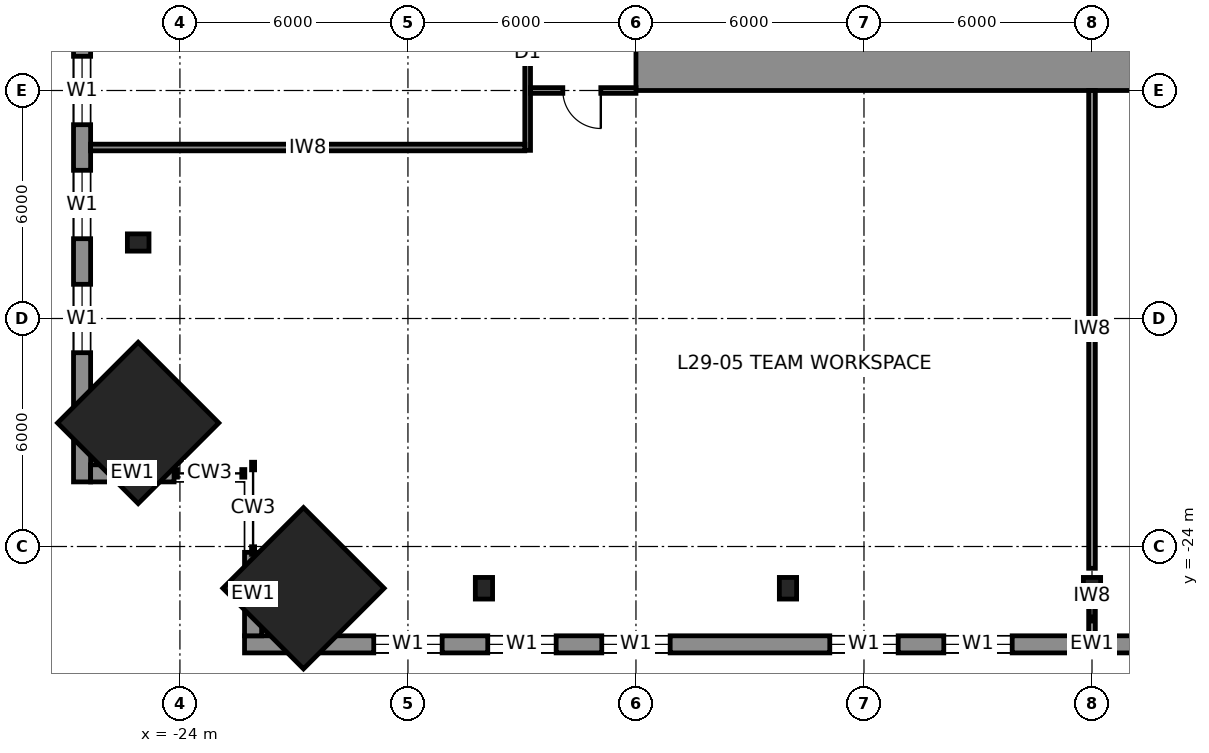
"""IFC4 building model, lengths in metres.
Left out: names, types, materials, properties, quantities, classifications, styles, units other than length and angle.
Written with IfcOpenShell. Run it as: python <this file> out.ifc"""

import sys

from ifc_helpers import new_model, si_unit, direction, frame, frame_2d, origin, origin_2d, place, context, subcontext, project, spatial, rectangle, i_section, extrude, element, fill, save


model = new_model("IFC4")
c1 = context("Model", 3, precision=1e-05, world=origin(), true_north=direction((0.0, 1.0)))
c2 = subcontext(c1, "Body", "Model", "MODEL_VIEW")
j1 = project(units=[si_unit("LENGTHUNIT", "METRE"), si_unit("PLANEANGLEUNIT", "RADIAN")], contexts=[c1])
p1 = place(None, origin())
s1 = spatial("IfcSite", under=j1, at=p1, CompositionType="ELEMENT")
p2 = place(p1, origin())
s2 = spatial("IfcBuilding", under=s1, at=p2, CompositionType="ELEMENT")
p3 = place(p2, frame((0.0, 0.0, 143.8)))
s3 = spatial("IfcBuildingStorey", under=s2, at=p3, CompositionType="ELEMENT", Elevation=143.8)
for number, where, z_axis, x_axis in (
    (1, (-20.748, -25.098, 0.0), (0.04, 0.04, 0.998), (-0.708, 0.707, 0.0)),
    (2, (-25.098, -20.748, 0.0), (0.04, 0.04, 0.998), (-0.707, 0.708, 0.0)),
):
    element("IfcColumn", number, at=place(p3, frame(where, z_axis=z_axis, x_axis=x_axis)), inside=s3, PredefinedType="COLUMN", context=c2, shape_type="SweptSolid", body=[
        extrude(rectangle(XDim=3.0, YDim=3.0, at=origin_2d()), origin(), (0.0, 0.0, 1.0), 4.007),
    ])
for number, where, z_axis, x_axis in (
    (3, (0.0, -25.098, 0.0), (0.0, 0.04, 0.999), (-1.0, 0.0, 0.0)),
    (4, (-8.0, -25.098, 0.0), (0.0, 0.04, 0.999), (-1.0, 0.0, 0.0)),
    (5, (-16.0, -25.098, 0.0), (0.0, 0.04, 0.999), (-1.0, 0.0, 0.0)),
    (6, (-25.098, -16.0, 0.0), (0.04, 0.0, 0.999), (0.0, 1.0, 0.0)),
):
    element("IfcColumn", number, at=place(p3, frame(where, z_axis=z_axis, x_axis=x_axis)), inside=s3, PredefinedType="COLUMN", context=c2, shape_type="SweptSolid", body=[
        extrude(i_section(OverallWidth=0.454, OverallDepth=0.569, WebThickness=0.078, FlangeThickness=0.125, at=origin_2d()), origin(), (0.0, 0.0, 1.0), 4.003),
    ])
p4 = place(p3, frame((12.0, -11.25, 0.0), z_axis=(0.0, 0.0, 1.0), x_axis=(-1.0, 0.0, 0.0)))
e7 = element("IfcWall", 7, at=p4, inside=s3, PredefinedType="SHEAR", context=c2, shape_type="SweptSolid", body=[
    extrude(rectangle(XDim=24.0, YDim=1.5, at=frame_2d((12.0, 0.0))), origin(), (0.0, 0.0, 1.0), 4.0),
])
p5 = place(p3, frame((-22.3, -26.575, 0.0), z_axis=(0.0, 0.0, 1.0), x_axis=(1.0, 0.0, 0.0)))
e8 = element("IfcWall", 8, at=p5, inside=s3, PredefinedType="SOLIDWALL", context=c2, shape_type="SweptSolid", body=[
    extrude(rectangle(XDim=44.6, YDim=0.45, at=frame_2d((22.3, 0.0))), origin(), (0.0, 0.0, 1.0), 3.83),
])
p6 = place(p5, frame((3.4, 0.0, 0.7)))
e9 = element("IfcOpeningElement", 9, at=p6, cuts=e8, PredefinedType="OPENING", context=c2, shape_type="SweptSolid", body=[
    extrude(rectangle(XDim=1.8, YDim=2.6, at=frame_2d((0.9, 1.3))), frame((0.0, 0.235, 0.0), z_axis=(0.0, -1.0, 0.0), x_axis=(1.0, 0.0, 0.0)), (0.0, 0.0, 1.0), 0.47),
])
p7 = place(p5, frame((6.4, 0.0, 0.7)))
e10 = element("IfcOpeningElement", 10, at=p7, cuts=e8, PredefinedType="OPENING", context=c2, shape_type="SweptSolid", body=[
    extrude(rectangle(XDim=1.8, YDim=2.6, at=frame_2d((0.9, 1.3))), frame((0.0, 0.235, 0.0), z_axis=(0.0, -1.0, 0.0), x_axis=(1.0, 0.0, 0.0)), (0.0, 0.0, 1.0), 0.47),
])
p8 = place(p5, frame((9.4, 0.0, 0.7)))
e11 = element("IfcOpeningElement", 11, at=p8, cuts=e8, PredefinedType="OPENING", context=c2, shape_type="SweptSolid", body=[
    extrude(rectangle(XDim=1.8, YDim=2.6, at=frame_2d((0.9, 1.3))), frame((0.0, 0.235, 0.0), z_axis=(0.0, -1.0, 0.0), x_axis=(1.0, 0.0, 0.0)), (0.0, 0.0, 1.0), 0.47),
])
p9 = place(p5, frame((15.4, 0.0, 0.7)))
e12 = element("IfcOpeningElement", 12, at=p9, cuts=e8, PredefinedType="OPENING", context=c2, shape_type="SweptSolid", body=[
    extrude(rectangle(XDim=1.8, YDim=2.6, at=frame_2d((0.9, 1.3))), frame((0.0, 0.235, 0.0), z_axis=(0.0, -1.0, 0.0), x_axis=(1.0, 0.0, 0.0)), (0.0, 0.0, 1.0), 0.47),
])
p10 = place(p5, frame((18.4, 0.0, 0.7)))
e13 = element("IfcOpeningElement", 13, at=p10, cuts=e8, PredefinedType="OPENING", context=c2, shape_type="SweptSolid", body=[
    extrude(rectangle(XDim=1.8, YDim=2.6, at=frame_2d((0.9, 1.3))), frame((0.0, 0.235, 0.0), z_axis=(0.0, -1.0, 0.0), x_axis=(1.0, 0.0, 0.0)), (0.0, 0.0, 1.0), 0.47),
])
p11 = place(p5, frame((24.4, 0.0, 0.7)))
e14 = element("IfcOpeningElement", 14, at=p11, cuts=e8, PredefinedType="OPENING", context=c2, shape_type="SweptSolid", body=[
    extrude(rectangle(XDim=1.8, YDim=2.6, at=frame_2d((0.9, 1.3))), frame((0.0, 0.235, 0.0), z_axis=(0.0, -1.0, 0.0), x_axis=(1.0, 0.0, 0.0)), (0.0, 0.0, 1.0), 0.47),
])
p12 = place(p5, frame((27.4, 0.0, 0.7)))
e15 = element("IfcOpeningElement", 15, at=p12, cuts=e8, PredefinedType="OPENING", context=c2, shape_type="SweptSolid", body=[
    extrude(rectangle(XDim=1.8, YDim=2.6, at=frame_2d((0.9, 1.3))), frame((0.0, 0.235, 0.0), z_axis=(0.0, -1.0, 0.0), x_axis=(1.0, 0.0, 0.0)), (0.0, 0.0, 1.0), 0.47),
])
p13 = place(p5, frame((33.4, 0.0, 0.7)))
e16 = element("IfcOpeningElement", 16, at=p13, cuts=e8, PredefinedType="OPENING", context=c2, shape_type="SweptSolid", body=[
    extrude(rectangle(XDim=1.8, YDim=2.6, at=frame_2d((0.9, 1.3))), frame((0.0, 0.235, 0.0), z_axis=(0.0, -1.0, 0.0), x_axis=(1.0, 0.0, 0.0)), (0.0, 0.0, 1.0), 0.47),
])
p14 = place(p5, frame((36.4, 0.0, 0.7)))
e17 = element("IfcOpeningElement", 17, at=p14, cuts=e8, PredefinedType="OPENING", context=c2, shape_type="SweptSolid", body=[
    extrude(rectangle(XDim=1.8, YDim=2.6, at=frame_2d((0.9, 1.3))), frame((0.0, 0.235, 0.0), z_axis=(0.0, -1.0, 0.0), x_axis=(1.0, 0.0, 0.0)), (0.0, 0.0, 1.0), 0.47),
])
p15 = place(p5, frame((39.4, 0.0, 0.7)))
e18 = element("IfcOpeningElement", 18, at=p15, cuts=e8, PredefinedType="OPENING", context=c2, shape_type="SweptSolid", body=[
    extrude(rectangle(XDim=1.8, YDim=2.6, at=frame_2d((0.9, 1.3))), frame((0.0, 0.235, 0.0), z_axis=(0.0, -1.0, 0.0), x_axis=(1.0, 0.0, 0.0)), (0.0, 0.0, 1.0), 0.47),
])
p16 = place(p3, frame((-26.575, 22.3, 0.0), z_axis=(0.0, 0.0, 1.0), x_axis=(0.0, -1.0, 0.0)))
e19 = element("IfcWall", 19, at=p16, inside=s3, PredefinedType="SOLIDWALL", context=c2, shape_type="SweptSolid", body=[
    extrude(rectangle(XDim=44.6, YDim=0.45, at=frame_2d((22.3, 0.0))), origin(), (0.0, 0.0, 1.0), 3.83),
])
p17 = place(p16, frame((3.4, 0.0, 0.7)))
e20 = element("IfcOpeningElement", 20, at=p17, cuts=e19, PredefinedType="OPENING", context=c2, shape_type="SweptSolid", body=[
    extrude(rectangle(XDim=1.8, YDim=2.6, at=frame_2d((0.9, 1.3))), frame((0.0, 0.235, 0.0), z_axis=(0.0, -1.0, 0.0), x_axis=(1.0, 0.0, 0.0)), (0.0, 0.0, 1.0), 0.47),
])
p18 = place(p16, frame((6.4, 0.0, 0.7)))
e21 = element("IfcOpeningElement", 21, at=p18, cuts=e19, PredefinedType="OPENING", context=c2, shape_type="SweptSolid", body=[
    extrude(rectangle(XDim=1.8, YDim=2.6, at=frame_2d((0.9, 1.3))), frame((0.0, 0.235, 0.0), z_axis=(0.0, -1.0, 0.0), x_axis=(1.0, 0.0, 0.0)), (0.0, 0.0, 1.0), 0.47),
])
p19 = place(p16, frame((9.4, 0.0, 0.7)))
e22 = element("IfcOpeningElement", 22, at=p19, cuts=e19, PredefinedType="OPENING", context=c2, shape_type="SweptSolid", body=[
    extrude(rectangle(XDim=1.8, YDim=2.6, at=frame_2d((0.9, 1.3))), frame((0.0, 0.235, 0.0), z_axis=(0.0, -1.0, 0.0), x_axis=(1.0, 0.0, 0.0)), (0.0, 0.0, 1.0), 0.47),
])
p20 = place(p16, frame((15.4, 0.0, 0.7)))
e23 = element("IfcOpeningElement", 23, at=p20, cuts=e19, PredefinedType="OPENING", context=c2, shape_type="SweptSolid", body=[
    extrude(rectangle(XDim=1.8, YDim=2.6, at=frame_2d((0.9, 1.3))), frame((0.0, 0.235, 0.0), z_axis=(0.0, -1.0, 0.0), x_axis=(1.0, 0.0, 0.0)), (0.0, 0.0, 1.0), 0.47),
])
p21 = place(p16, frame((18.4, 0.0, 0.7)))
e24 = element("IfcOpeningElement", 24, at=p21, cuts=e19, PredefinedType="OPENING", context=c2, shape_type="SweptSolid", body=[
    extrude(rectangle(XDim=1.8, YDim=2.6, at=frame_2d((0.9, 1.3))), frame((0.0, 0.235, 0.0), z_axis=(0.0, -1.0, 0.0), x_axis=(1.0, 0.0, 0.0)), (0.0, 0.0, 1.0), 0.47),
])
p22 = place(p16, frame((24.4, 0.0, 0.7)))
e25 = element("IfcOpeningElement", 25, at=p22, cuts=e19, PredefinedType="OPENING", context=c2, shape_type="SweptSolid", body=[
    extrude(rectangle(XDim=1.8, YDim=2.6, at=frame_2d((0.9, 1.3))), frame((0.0, 0.235, 0.0), z_axis=(0.0, -1.0, 0.0), x_axis=(1.0, 0.0, 0.0)), (0.0, 0.0, 1.0), 0.47),
])
p23 = place(p16, frame((27.4, 0.0, 0.7)))
e26 = element("IfcOpeningElement", 26, at=p23, cuts=e19, PredefinedType="OPENING", context=c2, shape_type="SweptSolid", body=[
    extrude(rectangle(XDim=1.8, YDim=2.6, at=frame_2d((0.9, 1.3))), frame((0.0, 0.235, 0.0), z_axis=(0.0, -1.0, 0.0), x_axis=(1.0, 0.0, 0.0)), (0.0, 0.0, 1.0), 0.47),
])
p24 = place(p16, frame((33.4, 0.0, 0.7)))
e27 = element("IfcOpeningElement", 27, at=p24, cuts=e19, PredefinedType="OPENING", context=c2, shape_type="SweptSolid", body=[
    extrude(rectangle(XDim=1.8, YDim=2.6, at=frame_2d((0.9, 1.3))), frame((0.0, 0.235, 0.0), z_axis=(0.0, -1.0, 0.0), x_axis=(1.0, 0.0, 0.0)), (0.0, 0.0, 1.0), 0.47),
])
p25 = place(p16, frame((36.4, 0.0, 0.7)))
e28 = element("IfcOpeningElement", 28, at=p25, cuts=e19, PredefinedType="OPENING", context=c2, shape_type="SweptSolid", body=[
    extrude(rectangle(XDim=1.8, YDim=2.6, at=frame_2d((0.9, 1.3))), frame((0.0, 0.235, 0.0), z_axis=(0.0, -1.0, 0.0), x_axis=(1.0, 0.0, 0.0)), (0.0, 0.0, 1.0), 0.47),
])
p26 = place(p16, frame((39.4, 0.0, 0.7)))
e29 = element("IfcOpeningElement", 29, at=p26, cuts=e19, PredefinedType="OPENING", context=c2, shape_type="SweptSolid", body=[
    extrude(rectangle(XDim=1.8, YDim=2.6, at=frame_2d((0.9, 1.3))), frame((0.0, 0.235, 0.0), z_axis=(0.0, -1.0, 0.0), x_axis=(1.0, 0.0, 0.0)), (0.0, 0.0, 1.0), 0.47),
])
for number, where, z_axis, x_axis in (
    (30, (-22.075, -24.154, 0.0), (0.0, 0.0, 1.0), (0.0, -1.0, 0.0)),
    (31, (-24.154, -22.075, 0.0), (0.0, 0.0, 1.0), (-1.0, 0.0, 0.0)),
):
    element("IfcWall", number, at=place(p3, frame(where, z_axis=z_axis, x_axis=x_axis)), inside=s3, PredefinedType="SOLIDWALL", context=c2, shape_type="SweptSolid", body=[
        extrude(rectangle(XDim=2.197, YDim=0.45, at=frame_2d((1.098, 0.0))), origin(), (0.0, 0.0, 1.0), 3.83),
    ])
p27 = place(p3, frame((-14.85, 14.775, 0.0), z_axis=(0.0, 0.0, 1.0), x_axis=(0.0, -1.0, 0.0)))
e32 = element("IfcWall", 32, at=p27, inside=s3, PredefinedType="PARTITIONING", context=c2, shape_type="SweptSolid", body=[
    extrude(rectangle(XDim=28.35, YDim=0.15, at=frame_2d((14.175, 0.0))), origin(), (0.0, 0.0, 1.0), 3.83),
])
p28 = place(p27, frame((24.175, 0.0, 0.0)))
e33 = element("IfcOpeningElement", 33, at=p28, cuts=e32, PredefinedType="OPENING", context=c2, shape_type="SweptSolid", body=[
    extrude(rectangle(XDim=1.0, YDim=2.3, at=frame_2d((0.5, 1.15))), frame((0.0, 0.085, 0.0), z_axis=(0.0, -1.0, 0.0), x_axis=(1.0, 0.0, 0.0)), (0.0, 0.0, 1.0), 0.17),
])
p29 = place(p27, frame((20.975, 0.0, 0.0)))
e34 = element("IfcOpeningElement", 34, at=p29, cuts=e32, PredefinedType="OPENING", context=c2, shape_type="SweptSolid", body=[
    extrude(rectangle(XDim=1.0, YDim=2.3, at=frame_2d((0.5, 1.15))), frame((0.0, 0.085, 0.0), z_axis=(0.0, -1.0, 0.0), x_axis=(1.0, 0.0, 0.0)), (0.0, 0.0, 1.0), 0.17),
])
p30 = place(p27, frame((7.825, 0.0, 0.0)))
e35 = element("IfcOpeningElement", 35, at=p30, cuts=e32, PredefinedType="OPENING", context=c2, shape_type="SweptSolid", body=[
    extrude(rectangle(XDim=1.0, YDim=2.3, at=frame_2d((0.5, 1.15))), frame((0.0, 0.085, 0.0), z_axis=(0.0, -1.0, 0.0), x_axis=(1.0, 0.0, 0.0)), (0.0, 0.0, 1.0), 0.17),
])
p31 = place(p27, frame((3.625, 0.0, 0.0)))
e36 = element("IfcOpeningElement", 36, at=p31, cuts=e32, PredefinedType="OPENING", context=c2, shape_type="SweptSolid", body=[
    extrude(rectangle(XDim=1.0, YDim=2.3, at=frame_2d((0.5, 1.15))), frame((0.0, 0.085, 0.0), z_axis=(0.0, -1.0, 0.0), x_axis=(1.0, 0.0, 0.0)), (0.0, 0.0, 1.0), 0.17),
])
p32 = place(p27, frame((10.775, 0.0, 0.0)))
e37 = element("IfcOpeningElement", 37, at=p32, cuts=e32, PredefinedType="OPENING", context=c2, shape_type="SweptSolid", body=[
    extrude(rectangle(XDim=1.0, YDim=2.3, at=frame_2d((0.5, 1.15))), frame((0.0, 0.085, 0.0), z_axis=(0.0, -1.0, 0.0), x_axis=(1.0, 0.0, 0.0)), (0.0, 0.0, 1.0), 0.17),
])
p33 = place(p27, frame((17.775, 0.0, 0.0)))
e38 = element("IfcOpeningElement", 38, at=p33, cuts=e32, PredefinedType="OPENING", context=c2, shape_type="SweptSolid", body=[
    extrude(rectangle(XDim=1.0, YDim=2.3, at=frame_2d((0.5, 1.15))), frame((0.0, 0.085, 0.0), z_axis=(0.0, -1.0, 0.0), x_axis=(1.0, 0.0, 0.0)), (0.0, 0.0, 1.0), 0.17),
])
p34 = place(p3, frame((-12.0, -12.0, 0.0), z_axis=(0.0, 0.0, 1.0), x_axis=(-1.0, 0.0, 0.0)))
e39 = element("IfcWall", 39, at=p34, inside=s3, PredefinedType="PARTITIONING", context=c2, shape_type="SweptSolid", body=[
    extrude(rectangle(XDim=2.775, YDim=0.15, at=frame_2d((1.387, 0.0))), origin(), (0.0, 0.0, 1.0), 3.83),
])
p35 = place(p34, frame((0.925, 0.0, 0.0)))
e40 = element("IfcOpeningElement", 40, at=p35, cuts=e39, PredefinedType="OPENING", context=c2, shape_type="SweptSolid", body=[
    extrude(rectangle(XDim=1.0, YDim=2.3, at=frame_2d((0.5, 1.15))), frame((0.0, 0.085, 0.0), z_axis=(0.0, -1.0, 0.0), x_axis=(1.0, 0.0, 0.0)), (0.0, 0.0, 1.0), 0.17),
])
p36 = place(p3, frame((-14.925, -13.5, 0.0), z_axis=(0.0, 0.0, 1.0), x_axis=(-1.0, 0.0, 0.0)))
e41 = element("IfcWall", 41, at=p36, inside=s3, PredefinedType="PARTITIONING", context=c2, shape_type="SweptSolid", body=[
    extrude(rectangle(XDim=11.425, YDim=0.175, at=frame_2d((5.712, 0.0))), origin(), (0.0, 0.0, 1.0), 3.83),
])
p37 = place(p3, frame((0.0, -12.0, 0.0), z_axis=(0.0, 0.0, 1.0), x_axis=(0.0, -1.0, 0.0)))
e42 = element("IfcWall", 42, at=p37, inside=s3, PredefinedType="PARTITIONING", context=c2, shape_type="SweptSolid", body=[
    extrude(rectangle(XDim=12.573, YDim=0.175, at=frame_2d((6.287, 0.0))), origin(), (0.0, 0.0, 1.0), 2.83),
])
p38 = place(p3, frame((0.0, -25.462, 0.0), z_axis=(0.0, 0.0, 1.0), x_axis=(0.0, -1.0, 0.0)))
e43 = element("IfcWall", 43, at=p38, inside=s3, PredefinedType="PARTITIONING", context=c2, shape_type="SweptSolid", body=[
    extrude(rectangle(XDim=0.888, YDim=0.175, at=frame_2d((0.444, 0.0))), origin(), (0.0, 0.0, 1.0), 3.83),
])
p39 = place(p6, origin())
e44 = element("IfcWindow", 44, at=p39, inside=s3, PartitioningType="SINGLE_PANEL", PredefinedType="WINDOW", context=c2, shape_type="SweptSolid", body=[
    extrude(rectangle(XDim=1.8, YDim=2.6, at=frame_2d((0.9, 1.3))), frame((0.0, 0.03, 0.0), z_axis=(0.0, -1.0, 0.0), x_axis=(1.0, 0.0, 0.0)), (0.0, 0.0, 1.0), 0.06),
])
fill(e9, e44)
p40 = place(p7, origin())
e45 = element("IfcWindow", 45, at=p40, inside=s3, PartitioningType="SINGLE_PANEL", PredefinedType="WINDOW", context=c2, shape_type="SweptSolid", body=[
    extrude(rectangle(XDim=1.8, YDim=2.6, at=frame_2d((0.9, 1.3))), frame((0.0, 0.03, 0.0), z_axis=(0.0, -1.0, 0.0), x_axis=(1.0, 0.0, 0.0)), (0.0, 0.0, 1.0), 0.06),
])
fill(e10, e45)
p41 = place(p8, origin())
e46 = element("IfcWindow", 46, at=p41, inside=s3, PartitioningType="SINGLE_PANEL", PredefinedType="WINDOW", context=c2, shape_type="SweptSolid", body=[
    extrude(rectangle(XDim=1.8, YDim=2.6, at=frame_2d((0.9, 1.3))), frame((0.0, 0.03, 0.0), z_axis=(0.0, -1.0, 0.0), x_axis=(1.0, 0.0, 0.0)), (0.0, 0.0, 1.0), 0.06),
])
fill(e11, e46)
p42 = place(p9, origin())
e47 = element("IfcWindow", 47, at=p42, inside=s3, PartitioningType="SINGLE_PANEL", PredefinedType="WINDOW", context=c2, shape_type="SweptSolid", body=[
    extrude(rectangle(XDim=1.8, YDim=2.6, at=frame_2d((0.9, 1.3))), frame((0.0, 0.03, 0.0), z_axis=(0.0, -1.0, 0.0), x_axis=(1.0, 0.0, 0.0)), (0.0, 0.0, 1.0), 0.06),
])
fill(e12, e47)
p43 = place(p10, origin())
e48 = element("IfcWindow", 48, at=p43, inside=s3, PartitioningType="SINGLE_PANEL", PredefinedType="WINDOW", context=c2, shape_type="SweptSolid", body=[
    extrude(rectangle(XDim=1.8, YDim=2.6, at=frame_2d((0.9, 1.3))), frame((0.0, 0.03, 0.0), z_axis=(0.0, -1.0, 0.0), x_axis=(1.0, 0.0, 0.0)), (0.0, 0.0, 1.0), 0.06),
])
fill(e13, e48)
p44 = place(p24, origin())
e49 = element("IfcWindow", 49, at=p44, inside=s3, PartitioningType="SINGLE_PANEL", PredefinedType="WINDOW", context=c2, shape_type="SweptSolid", body=[
    extrude(rectangle(XDim=1.8, YDim=2.6, at=frame_2d((0.9, 1.3))), frame((0.0, 0.03, 0.0), z_axis=(0.0, -1.0, 0.0), x_axis=(1.0, 0.0, 0.0)), (0.0, 0.0, 1.0), 0.06),
])
fill(e27, e49)
p45 = place(p25, origin())
e50 = element("IfcWindow", 50, at=p45, inside=s3, PartitioningType="SINGLE_PANEL", PredefinedType="WINDOW", context=c2, shape_type="SweptSolid", body=[
    extrude(rectangle(XDim=1.8, YDim=2.6, at=frame_2d((0.9, 1.3))), frame((0.0, 0.03, 0.0), z_axis=(0.0, -1.0, 0.0), x_axis=(1.0, 0.0, 0.0)), (0.0, 0.0, 1.0), 0.06),
])
fill(e28, e50)
p46 = place(p26, origin())
e51 = element("IfcWindow", 51, at=p46, inside=s3, PartitioningType="SINGLE_PANEL", PredefinedType="WINDOW", context=c2, shape_type="SweptSolid", body=[
    extrude(rectangle(XDim=1.8, YDim=2.6, at=frame_2d((0.9, 1.3))), frame((0.0, 0.03, 0.0), z_axis=(0.0, -1.0, 0.0), x_axis=(1.0, 0.0, 0.0)), (0.0, 0.0, 1.0), 0.06),
])
fill(e29, e51)
p47 = place(p35, origin())
e52 = element("IfcDoor", 52, at=p47, inside=s3, OperationType="SINGLE_SWING_LEFT", PredefinedType="DOOR", context=c2, shape_type="SweptSolid", body=[
    extrude(rectangle(XDim=1.0, YDim=2.3, at=frame_2d((0.5, 1.15))), frame((0.0, 0.025, 0.0), z_axis=(0.0, -1.0, 0.0), x_axis=(1.0, 0.0, 0.0)), (0.0, 0.0, 1.0), 0.05),
])
fill(e40, e52)
save(model, sys.argv[1])
